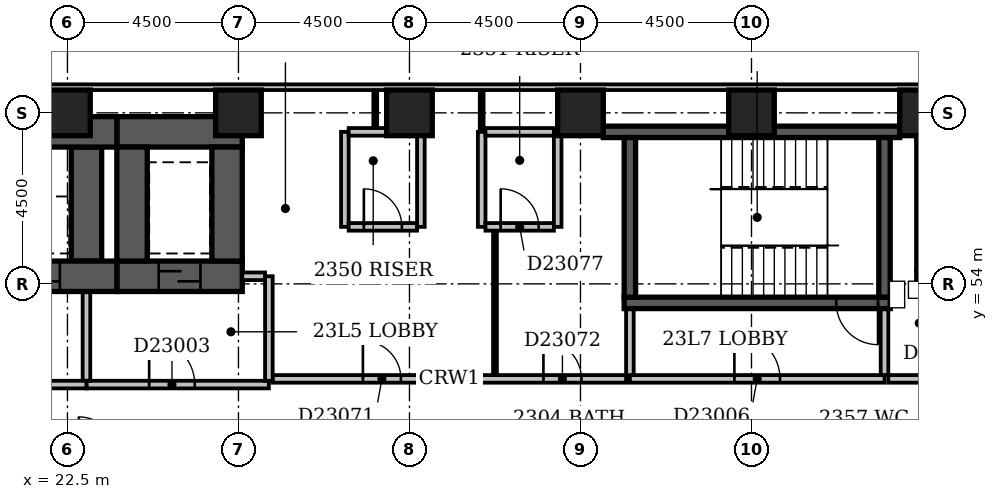
"""IFC4 building model, lengths in metres.
Left out: names, types, materials, properties, quantities, classifications, styles, units other than length and angle.
Written with IfcOpenShell. Run it as: python <this file> out.ifc"""

import sys

from ifc_helpers import new_model, si_unit, direction, frame, frame_2d, origin, origin_2d, place, context, subcontext, project, spatial, rectangle, extrude, element, fill, save


model = new_model("IFC4")
c1 = context("Model", 3, precision=1e-05, world=origin(), true_north=direction((0.0, 1.0)))
c2 = subcontext(c1, "Body", "Model", "MODEL_VIEW")
j1 = project(units=[si_unit("LENGTHUNIT", "METRE"), si_unit("PLANEANGLEUNIT", "RADIAN")], contexts=[c1])
p1 = place(None, origin())
s1 = spatial("IfcSite", under=j1, at=p1, CompositionType="ELEMENT")
p2 = place(p1, origin())
s2 = spatial("IfcBuilding", under=s1, at=p2, CompositionType="ELEMENT")
p3 = place(p2, frame((0.0, 0.0, 93.8)))
s3 = spatial("IfcBuildingStorey", under=s2, at=p3, CompositionType="ELEMENT", Elevation=93.8)
p4 = place(p3, frame((7.35, 54.2, -0.3), z_axis=(0.0, 0.0, 1.0), x_axis=(1.0, 0.0, 0.0)))
e1 = element("IfcWall", 1, at=p4, inside=s3, PredefinedType="SHEAR", context=c2, shape_type="SweptSolid", body=[
    extrude(rectangle(XDim=16.45, YDim=0.8, at=frame_2d((8.225, 0.0))), origin(), (0.0, 0.0, 1.0), 3.6),
])
p5 = place(p4, frame((1.35, 0.0, 0.3)))
e2 = element("IfcOpeningElement", 2, at=p5, cuts=e1, PredefinedType="OPENING", context=c2, shape_type="SweptSolid", body=[
    extrude(rectangle(XDim=1.1, YDim=2.1, at=frame_2d((0.55, 1.05))), frame((0.0, 0.412, 0.0), z_axis=(0.0, -1.0, 0.0), x_axis=(1.0, 0.0, 0.0)), (0.0, 0.0, 1.0), 0.824),
])
p6 = place(p4, frame((3.85, 0.0, 0.3)))
e3 = element("IfcOpeningElement", 3, at=p6, cuts=e1, PredefinedType="OPENING", context=c2, shape_type="SweptSolid", body=[
    extrude(rectangle(XDim=1.1, YDim=2.1, at=frame_2d((0.55, 1.05))), frame((0.0, 0.412, 0.0), z_axis=(0.0, -1.0, 0.0), x_axis=(1.0, 0.0, 0.0)), (0.0, 0.0, 1.0), 0.824),
])
p7 = place(p4, frame((6.35, 0.0, 0.3)))
e4 = element("IfcOpeningElement", 4, at=p7, cuts=e1, PredefinedType="OPENING", context=c2, shape_type="SweptSolid", body=[
    extrude(rectangle(XDim=1.1, YDim=2.1, at=frame_2d((0.55, 1.05))), frame((0.0, 0.412, 0.0), z_axis=(0.0, -1.0, 0.0), x_axis=(1.0, 0.0, 0.0)), (0.0, 0.0, 1.0), 0.824),
])
p8 = place(p4, frame((8.85, 0.0, 0.3)))
e5 = element("IfcOpeningElement", 5, at=p8, cuts=e1, PredefinedType="OPENING", context=c2, shape_type="SweptSolid", body=[
    extrude(rectangle(XDim=1.1, YDim=2.1, at=frame_2d((0.55, 1.05))), frame((0.0, 0.412, 0.0), z_axis=(0.0, -1.0, 0.0), x_axis=(1.0, 0.0, 0.0)), (0.0, 0.0, 1.0), 0.824),
])
p9 = place(p4, frame((11.35, 0.0, 0.3)))
e6 = element("IfcOpeningElement", 6, at=p9, cuts=e1, PredefinedType="OPENING", context=c2, shape_type="SweptSolid", body=[
    extrude(rectangle(XDim=1.1, YDim=2.1, at=frame_2d((0.55, 1.05))), frame((0.0, 0.412, 0.0), z_axis=(0.0, -1.0, 0.0), x_axis=(1.0, 0.0, 0.0)), (0.0, 0.0, 1.0), 0.824),
])
p10 = place(p4, frame((13.85, 0.0, 0.3)))
e7 = element("IfcOpeningElement", 7, at=p10, cuts=e1, PredefinedType="OPENING", context=c2, shape_type="SweptSolid", body=[
    extrude(rectangle(XDim=1.1, YDim=2.1, at=frame_2d((0.55, 1.05))), frame((0.0, 0.412, 0.0), z_axis=(0.0, -1.0, 0.0), x_axis=(1.0, 0.0, 0.0)), (0.0, 0.0, 1.0), 0.824),
])
p11 = place(p3, frame((7.35, 58.0, -0.3), z_axis=(0.0, 0.0, 1.0), x_axis=(1.0, 0.0, 0.0)))
e8 = element("IfcWall", 8, at=p11, inside=s3, PredefinedType="SHEAR", context=c2, shape_type="SweptSolid", body=[
    extrude(rectangle(XDim=16.45, YDim=0.8, at=frame_2d((8.225, 0.0))), origin(), (0.0, 0.0, 1.0), 3.6),
])
p12 = place(p3, frame((23.0, 54.6, -0.3), z_axis=(0.0, 0.0, 1.0), x_axis=(0.0, 1.0, 0.0)))
e9 = element("IfcWall", 9, at=p12, inside=s3, PredefinedType="SHEAR", context=c2, shape_type="SweptSolid", body=[
    extrude(rectangle(XDim=3.0, YDim=0.8, at=frame_2d((1.5, 0.0))), origin(), (0.0, 0.0, 1.0), 3.6),
])
p13 = place(p3, frame((23.8, 54.2, -0.3), z_axis=(0.0, 0.0, 1.0), x_axis=(1.0, 0.0, 0.0)))
e10 = element("IfcWall", 10, at=p13, inside=s3, PredefinedType="SHEAR", context=c2, shape_type="SweptSolid", body=[
    extrude(rectangle(XDim=3.3, YDim=0.8, at=frame_2d((1.65, 0.0))), origin(), (0.0, 0.0, 1.0), 3.6),
])
p14 = place(p13, frame((1.1, 0.0, 0.3)))
e11 = element("IfcOpeningElement", 11, at=p14, cuts=e10, PredefinedType="OPENING", context=c2, shape_type="SweptSolid", body=[
    extrude(rectangle(XDim=1.1, YDim=2.1, at=frame_2d((0.55, 1.05))), frame((0.0, 0.412, 0.0), z_axis=(0.0, -1.0, 0.0), x_axis=(1.0, 0.0, 0.0)), (0.0, 0.0, 1.0), 0.824),
])
p15 = place(p3, frame((23.8, 58.0, -0.3), z_axis=(0.0, 0.0, 1.0), x_axis=(1.0, 0.0, 0.0)))
e12 = element("IfcWall", 12, at=p15, inside=s3, PredefinedType="SHEAR", context=c2, shape_type="SweptSolid", body=[
    extrude(rectangle(XDim=3.3, YDim=0.8, at=frame_2d((1.65, 0.0))), origin(), (0.0, 0.0, 1.0), 3.6),
])
for number, where, z_axis, x_axis in (
    (13, (24.2, 54.6, -0.3), (0.0, 0.0, 1.0), (0.0, 1.0, 0.0)),
    (14, (26.7, 54.6, -0.3), (0.0, 0.0, 1.0), (0.0, 1.0, 0.0)),
):
    element("IfcWall", number, at=place(p3, frame(where, z_axis=z_axis, x_axis=x_axis)), inside=s3, PredefinedType="SHEAR", context=c2, shape_type="SweptSolid", body=[
        extrude(rectangle(XDim=3.0, YDim=0.8, at=frame_2d((1.5, 0.0))), origin(), (0.0, 0.0, 1.0), 3.6),
    ])
p16 = place(p3, frame((36.6, 58.0, -0.3), z_axis=(0.0, 0.0, 1.0), x_axis=(1.0, 0.0, 0.0)))
e15 = element("IfcWall", 15, at=p16, inside=s3, PredefinedType="SHEAR", context=c2, shape_type="SweptSolid", body=[
    extrude(rectangle(XDim=7.8, YDim=0.3, at=frame_2d((3.9, 0.0))), origin(), (0.0, 0.0, 1.0), 3.6),
])
p17 = place(p3, frame((37.15, 53.5, -0.3), z_axis=(0.0, 0.0, 1.0), x_axis=(1.0, 0.0, 0.0)))
e16 = element("IfcWall", 16, at=p17, inside=s3, PredefinedType="SHEAR", context=c2, shape_type="SweptSolid", body=[
    extrude(rectangle(XDim=7.0, YDim=0.3, at=frame_2d((3.5, 0.0))), origin(), (0.0, 0.0, 1.0), 3.6),
])
p18 = place(p17, frame((5.58, 0.0, 0.3)))
e17 = element("IfcOpeningElement", 17, at=p18, cuts=e16, PredefinedType="OPENING", context=c2, shape_type="SweptSolid", body=[
    extrude(rectangle(XDim=1.1, YDim=2.1, at=frame_2d((0.55, 1.05))), frame((0.0, 0.162, 0.0), z_axis=(0.0, -1.0, 0.0), x_axis=(1.0, 0.0, 0.0)), (0.0, 0.0, 1.0), 0.324),
])
for number, where, z_axis, x_axis in (
    (18, (37.3, 53.65, -0.3), (0.0, 0.0, 1.0), (0.0, 1.0, 0.0)),
    (19, (44.0, 53.65, -0.3), (0.0, 0.0, 1.0), (0.0, 1.0, 0.0)),
):
    element("IfcWall", number, at=place(p3, frame(where, z_axis=z_axis, x_axis=x_axis)), inside=s3, PredefinedType="SHEAR", context=c2, shape_type="SweptSolid", body=[
        extrude(rectangle(XDim=4.2, YDim=0.3, at=frame_2d((2.1, 0.0))), origin(), (0.0, 0.0, 1.0), 3.6),
    ])
p19 = place(p3, frame((44.85, 54.2, -0.3), z_axis=(0.0, 0.0, 1.0), x_axis=(1.0, 0.0, 0.0)))
e20 = element("IfcWall", 20, at=p19, inside=s3, PredefinedType="SHEAR", context=c2, shape_type="SweptSolid", body=[
    extrude(rectangle(XDim=2.15, YDim=0.3, at=frame_2d((1.075, 0.0))), origin(), (0.0, 0.0, 1.0), 3.6),
])
p20 = place(p19, frame((0.65, 0.0, 0.3)))
e21 = element("IfcOpeningElement", 21, at=p20, cuts=e20, PredefinedType="OPENING", context=c2, shape_type="SweptSolid", body=[
    extrude(rectangle(XDim=1.0, YDim=2.1, at=frame_2d((0.5, 1.05))), frame((0.0, 0.162, 0.0), z_axis=(0.0, -1.0, 0.0), x_axis=(1.0, 0.0, 0.0)), (0.0, 0.0, 1.0), 0.324),
])
p21 = place(p3, frame((44.85, 58.0, -0.3), z_axis=(0.0, 0.0, 1.0), x_axis=(1.0, 0.0, 0.0)))
e22 = element("IfcWall", 22, at=p21, inside=s3, PredefinedType="SHEAR", context=c2, shape_type="SweptSolid", body=[
    extrude(rectangle(XDim=2.15, YDim=0.3, at=frame_2d((1.075, 0.0))), origin(), (0.0, 0.0, 1.0), 3.6),
])
p22 = place(p3, frame((45.0, 54.35, -0.3), z_axis=(0.0, 0.0, 1.0), x_axis=(0.0, 1.0, 0.0)))
e23 = element("IfcWall", 23, at=p22, inside=s3, PredefinedType="SHEAR", context=c2, shape_type="SweptSolid", body=[
    extrude(rectangle(XDim=3.5, YDim=0.3, at=frame_2d((1.75, 0.0))), origin(), (0.0, 0.0, 1.0), 3.6),
])
for number, where, z_axis, x_axis in (
    (24, (22.5, 58.5, -0.3), (0.0, 0.0, 1.0), (1.0, 0.0, 0.0)),
    (25, (27.0, 58.5, -0.3), (0.0, 0.0, 1.0), (1.0, 0.0, 0.0)),
    (26, (31.5, 58.5, -0.3), (0.0, 0.0, 1.0), (1.0, 0.0, 0.0)),
    (27, (36.0, 58.5, -0.3), (0.0, 0.0, 1.0), (1.0, 0.0, 0.0)),
    (28, (40.5, 58.5, -0.3), (0.0, 0.0, 1.0), (1.0, 0.0, 0.0)),
    (29, (45.0, 58.5, -0.3), (0.0, 0.0, 1.0), (1.0, 0.0, 0.0)),
):
    element("IfcColumn", number, at=place(p3, frame(where, z_axis=z_axis, x_axis=x_axis)), inside=s3, PredefinedType="COLUMN", context=c2, shape_type="SweptSolid", body=[
        extrude(rectangle(XDim=1.2, YDim=1.2, at=origin_2d()), origin(), (0.0, 0.0, 1.0), 3.6),
    ])
p23 = place(p3, frame((68.1, 59.175, 0.0), z_axis=(0.0, 0.0, 1.0), x_axis=(-1.0, 0.0, 0.0)))
e30 = element("IfcWall", 30, at=p23, inside=s3, PredefinedType="STANDARD", context=c2, shape_type="SweptSolid", body=[
    extrude(rectangle(XDim=68.85, YDim=0.15, at=frame_2d((34.425, 0.0))), origin(), (0.0, 0.0, 1.0), 2.7),
])
p24 = place(p23, frame((2.49, 0.0, 0.6)))
e31 = element("IfcOpeningElement", 31, at=p24, cuts=e30, PredefinedType="OPENING", context=c2, shape_type="SweptSolid", body=[
    extrude(rectangle(XDim=1.8, YDim=1.8, at=frame_2d((0.9, 0.9))), frame((0.0, 0.087, 0.0), z_axis=(0.0, -1.0, 0.0), x_axis=(1.0, 0.0, 0.0)), (0.0, 0.0, 1.0), 0.174),
])
p25 = place(p23, frame((6.15, 0.0, 0.6)))
e32 = element("IfcOpeningElement", 32, at=p25, cuts=e30, PredefinedType="OPENING", context=c2, shape_type="SweptSolid", body=[
    extrude(rectangle(XDim=2.4, YDim=1.8, at=frame_2d((1.2, 0.9))), frame((0.0, 0.087, 0.0), z_axis=(0.0, -1.0, 0.0), x_axis=(1.0, 0.0, 0.0)), (0.0, 0.0, 1.0), 0.174),
])
p26 = place(p3, frame((8.0, 51.35, 0.0), z_axis=(0.0, 0.0, 1.0), x_axis=(1.0, 0.0, 0.0)))
e33 = element("IfcWall", 33, at=p26, inside=s3, PredefinedType="PARTITIONING", context=c2, shape_type="SweptSolid", body=[
    extrude(rectangle(XDim=15.0, YDim=0.2, at=frame_2d((7.5, 0.0))), origin(), (0.0, 0.0, 1.0), 3.3),
])
p27 = place(p26, frame((3.4, 0.0, 0.0)))
e34 = element("IfcOpeningElement", 34, at=p27, cuts=e33, PredefinedType="OPENING", context=c2, shape_type="SweptSolid", body=[
    extrude(rectangle(XDim=1.2, YDim=2.1, at=frame_2d((0.6, 1.05))), frame((0.0, 0.112, 0.0), z_axis=(0.0, -1.0, 0.0), x_axis=(1.0, 0.0, 0.0)), (0.0, 0.0, 1.0), 0.224),
])
p28 = place(p26, frame((9.4, 0.0, 0.0)))
e35 = element("IfcOpeningElement", 35, at=p28, cuts=e33, PredefinedType="OPENING", context=c2, shape_type="SweptSolid", body=[
    extrude(rectangle(XDim=1.2, YDim=2.1, at=frame_2d((0.6, 1.05))), frame((0.0, 0.112, 0.0), z_axis=(0.0, -1.0, 0.0), x_axis=(1.0, 0.0, 0.0)), (0.0, 0.0, 1.0), 0.224),
])
p29 = place(p3, frame((23.0, 51.45, 0.0), z_axis=(0.0, 0.0, 1.0), x_axis=(0.0, 1.0, 0.0)))
e36 = element("IfcWall", 36, at=p29, inside=s3, PredefinedType="PARTITIONING", context=c2, shape_type="SweptSolid", body=[
    extrude(rectangle(XDim=2.33, YDim=0.2, at=frame_2d((1.165, 0.0))), origin(), (0.0, 0.0, 1.0), 3.3),
])
p30 = place(p3, frame((23.0, 51.35, 0.0), z_axis=(0.0, 0.0, 1.0), x_axis=(1.0, 0.0, 0.0)))
e37 = element("IfcWall", 37, at=p30, inside=s3, PredefinedType="PARTITIONING", context=c2, shape_type="SweptSolid", body=[
    extrude(rectangle(XDim=4.8, YDim=0.2, at=frame_2d((2.4, 0.0))), origin(), (0.0, 0.0, 1.0), 3.3),
])
p31 = place(p30, frame((1.65, 0.0, 0.0)))
e38 = element("IfcOpeningElement", 38, at=p31, cuts=e37, PredefinedType="OPENING", context=c2, shape_type="SweptSolid", body=[
    extrude(rectangle(XDim=1.2, YDim=2.1, at=frame_2d((0.6, 1.05))), frame((0.0, 0.112, 0.0), z_axis=(0.0, -1.0, 0.0), x_axis=(1.0, 0.0, 0.0)), (0.0, 0.0, 1.0), 0.224),
])
p32 = place(p3, frame((27.8, 51.45, 0.0), z_axis=(0.0, 0.0, 1.0), x_axis=(0.0, 1.0, 0.0)))
e39 = element("IfcWall", 39, at=p32, inside=s3, PredefinedType="PARTITIONING", context=c2, shape_type="SweptSolid", body=[
    extrude(rectangle(XDim=2.75, YDim=0.2, at=frame_2d((1.375, 0.0))), origin(), (0.0, 0.0, 1.0), 3.3),
])
p33 = place(p3, frame((27.1, 54.2, 0.0), z_axis=(0.0, 0.0, 1.0), x_axis=(1.0, 0.0, 0.0)))
e40 = element("IfcWall", 40, at=p33, inside=s3, PredefinedType="PARTITIONING", context=c2, shape_type="SweptSolid", body=[
    extrude(rectangle(XDim=0.6, YDim=0.2, at=frame_2d((0.3, 0.0))), origin(), (0.0, 0.0, 1.0), 3.3),
])
p34 = place(p3, frame((37.3, 51.5, 0.0), z_axis=(0.0, 0.0, 1.0), x_axis=(1.0, 0.0, 0.0)))
e41 = element("IfcWall", 41, at=p34, inside=s3, PredefinedType="PARTITIONING", context=c2, shape_type="SweptSolid", body=[
    extrude(rectangle(XDim=6.7, YDim=0.2, at=frame_2d((3.35, 0.0))), origin(), (0.0, 0.0, 1.0), 3.3),
])
p35 = place(p34, frame((2.75, 0.0, 0.0)))
e42 = element("IfcOpeningElement", 42, at=p35, cuts=e41, PredefinedType="OPENING", context=c2, shape_type="SweptSolid", body=[
    extrude(rectangle(XDim=1.2, YDim=2.1, at=frame_2d((0.6, 1.05))), frame((0.0, 0.112, 0.0), z_axis=(0.0, -1.0, 0.0), x_axis=(1.0, 0.0, 0.0)), (0.0, 0.0, 1.0), 0.224),
])
for number, where, z_axis, x_axis in (
    (43, (44.0, 51.6, 0.0), (0.0, 0.0, 1.0), (0.0, 1.0, 0.0)),
    (44, (37.3, 51.6, 0.0), (0.0, 0.0, 1.0), (0.0, 1.0, 0.0)),
):
    element("IfcWall", number, at=place(p3, frame(where, z_axis=z_axis, x_axis=x_axis)), inside=s3, PredefinedType="PARTITIONING", context=c2, shape_type="SweptSolid", body=[
        extrude(rectangle(XDim=1.73, YDim=0.2, at=frame_2d((0.865, 0.0))), origin(), (0.0, 0.0, 1.0), 3.3),
    ])
p36 = place(p3, frame((27.9, 51.5, 0.0), z_axis=(0.0, 0.0, 1.0), x_axis=(1.0, 0.0, 0.0)))
e45 = element("IfcWall", 45, at=p36, inside=s3, PredefinedType="PARTITIONING", context=c2, shape_type="SweptSolid", body=[
    extrude(rectangle(XDim=9.3, YDim=0.2, at=frame_2d((4.65, 0.0))), origin(), (0.0, 0.0, 1.0), 3.3),
])
p37 = place(p36, frame((2.375, 0.0, 0.0)))
e46 = element("IfcOpeningElement", 46, at=p37, cuts=e45, PredefinedType="OPENING", context=c2, shape_type="SweptSolid", body=[
    extrude(rectangle(XDim=1.0, YDim=2.1, at=frame_2d((0.5, 1.05))), frame((0.0, 0.112, 0.0), z_axis=(0.0, -1.0, 0.0), x_axis=(1.0, 0.0, 0.0)), (0.0, 0.0, 1.0), 0.224),
])
p38 = place(p36, frame((7.125, 0.0, 0.0)))
e47 = element("IfcOpeningElement", 47, at=p38, cuts=e45, PredefinedType="OPENING", context=c2, shape_type="SweptSolid", body=[
    extrude(rectangle(XDim=1.0, YDim=2.1, at=frame_2d((0.5, 1.05))), frame((0.0, 0.112, 0.0), z_axis=(0.0, -1.0, 0.0), x_axis=(1.0, 0.0, 0.0)), (0.0, 0.0, 1.0), 0.224),
])
p39 = place(p3, frame((44.1, 51.5, 0.0), z_axis=(0.0, 0.0, 1.0), x_axis=(1.0, 0.0, 0.0)))
e48 = element("IfcWall", 48, at=p39, inside=s3, PredefinedType="PARTITIONING", context=c2, shape_type="SweptSolid", body=[
    extrude(rectangle(XDim=2.8, YDim=0.2, at=frame_2d((1.4, 0.0))), origin(), (0.0, 0.0, 1.0), 3.3),
])
p40 = place(p39, frame((1.0, 0.0, 0.0)))
e49 = element("IfcOpeningElement", 49, at=p40, cuts=e48, PredefinedType="OPENING", context=c2, shape_type="SweptSolid", body=[
    extrude(rectangle(XDim=0.8, YDim=2.1, at=frame_2d((0.4, 1.05))), frame((0.0, 0.112, 0.0), z_axis=(0.0, -1.0, 0.0), x_axis=(1.0, 0.0, 0.0)), (0.0, 0.0, 1.0), 0.224),
])
p41 = place(p3, frame((33.75, 51.6, 0.0), z_axis=(0.0, 0.0, 1.0), x_axis=(0.0, 1.0, 0.0)))
e50 = element("IfcWall", 50, at=p41, inside=s3, PredefinedType="PARTITIONING", context=c2, shape_type="SweptSolid", body=[
    extrude(rectangle(XDim=3.8, YDim=0.1, at=frame_2d((1.9, 0.0))), origin(), (0.0, 0.0, 1.0), 3.3),
])
p42 = place(p3, frame((29.8, 55.5, 0.0), z_axis=(0.0, 0.0, 1.0), x_axis=(0.0, 1.0, 0.0)))
e51 = element("IfcWall", 51, at=p42, inside=s3, PredefinedType="PARTITIONING", context=c2, shape_type="SweptSolid", body=[
    extrude(rectangle(XDim=2.5, YDim=0.2, at=frame_2d((1.25, 0.0))), origin(), (0.0, 0.0, 1.0), 3.3),
])
p43 = place(p3, frame((29.9, 55.5, 0.0), z_axis=(0.0, 0.0, 1.0), x_axis=(1.0, 0.0, 0.0)))
e52 = element("IfcWall", 52, at=p43, inside=s3, PredefinedType="PARTITIONING", context=c2, shape_type="SweptSolid", body=[
    extrude(rectangle(XDim=1.8, YDim=0.2, at=frame_2d((0.9, 0.0))), origin(), (0.0, 0.0, 1.0), 3.3),
])
p44 = place(p43, frame((0.4, 0.0, 0.0)))
e53 = element("IfcOpeningElement", 53, at=p44, cuts=e52, PredefinedType="OPENING", context=c2, shape_type="SweptSolid", body=[
    extrude(rectangle(XDim=1.0, YDim=2.1, at=frame_2d((0.5, 1.05))), frame((0.0, 0.112, 0.0), z_axis=(0.0, -1.0, 0.0), x_axis=(1.0, 0.0, 0.0)), (0.0, 0.0, 1.0), 0.224),
])
for number, where, z_axis, x_axis in (
    (54, (31.8, 55.5, 0.0), (0.0, 0.0, 1.0), (0.0, 1.0, 0.0)),
    (55, (33.4, 55.5, 0.0), (0.0, 0.0, 1.0), (0.0, 1.0, 0.0)),
):
    element("IfcWall", number, at=place(p3, frame(where, z_axis=z_axis, x_axis=x_axis)), inside=s3, PredefinedType="PARTITIONING", context=c2, shape_type="SweptSolid", body=[
        extrude(rectangle(XDim=2.5, YDim=0.2, at=frame_2d((1.25, 0.0))), origin(), (0.0, 0.0, 1.0), 3.3),
    ])
p45 = place(p3, frame((33.5, 55.5, 0.0), z_axis=(0.0, 0.0, 1.0), x_axis=(1.0, 0.0, 0.0)))
e56 = element("IfcWall", 56, at=p45, inside=s3, PredefinedType="PARTITIONING", context=c2, shape_type="SweptSolid", body=[
    extrude(rectangle(XDim=1.8, YDim=0.2, at=frame_2d((0.9, 0.0))), origin(), (0.0, 0.0, 1.0), 3.3),
])
p46 = place(p45, frame((0.4, 0.0, 0.0)))
e57 = element("IfcOpeningElement", 57, at=p46, cuts=e56, PredefinedType="OPENING", context=c2, shape_type="SweptSolid", body=[
    extrude(rectangle(XDim=1.0, YDim=2.1, at=frame_2d((0.5, 1.05))), frame((0.0, 0.112, 0.0), z_axis=(0.0, -1.0, 0.0), x_axis=(1.0, 0.0, 0.0)), (0.0, 0.0, 1.0), 0.224),
])
p47 = place(p3, frame((35.4, 55.5, 0.0), z_axis=(0.0, 0.0, 1.0), x_axis=(0.0, 1.0, 0.0)))
e58 = element("IfcWall", 58, at=p47, inside=s3, PredefinedType="PARTITIONING", context=c2, shape_type="SweptSolid", body=[
    extrude(rectangle(XDim=2.5, YDim=0.2, at=frame_2d((1.25, 0.0))), origin(), (0.0, 0.0, 1.0), 2.4),
])
p48 = place(p3, frame((29.9, 58.0, 0.0), z_axis=(0.0, 0.0, 1.0), x_axis=(1.0, 0.0, 0.0)))
e59 = element("IfcWall", 59, at=p48, inside=s3, PredefinedType="PARTITIONING", context=c2, shape_type="SweptSolid", body=[
    extrude(rectangle(XDim=1.8, YDim=0.2, at=frame_2d((0.9, 0.0))), origin(), (0.0, 0.0, 1.0), 3.3),
])
p49 = place(p3, frame((33.4, 58.0, 0.0), z_axis=(0.0, 0.0, 1.0), x_axis=(0.0, 1.0, 0.0)))
e60 = element("IfcWall", 60, at=p49, inside=s3, PredefinedType="PARTITIONING", context=c2, shape_type="SweptSolid", body=[
    extrude(rectangle(XDim=1.1, YDim=0.1, at=frame_2d((0.55, 0.0))), origin(), (0.0, 0.0, 1.0), 3.3),
])
p50 = place(p3, frame((33.5, 58.0, 0.0), z_axis=(0.0, 0.0, 1.0), x_axis=(1.0, 0.0, 0.0)))
e61 = element("IfcWall", 61, at=p50, inside=s3, PredefinedType="PARTITIONING", context=c2, shape_type="SweptSolid", body=[
    extrude(rectangle(XDim=1.8, YDim=0.2, at=frame_2d((0.9, 0.0))), origin(), (0.0, 0.0, 1.0), 3.3),
])
p51 = place(p3, frame((30.6, 58.1, 0.0), z_axis=(0.0, 0.0, 1.0), x_axis=(0.0, 1.0, 0.0)))
e62 = element("IfcWall", 62, at=p51, inside=s3, PredefinedType="PARTITIONING", context=c2, shape_type="SweptSolid", body=[
    extrude(rectangle(XDim=1.0, YDim=0.1, at=frame_2d((0.5, 0.0))), origin(), (0.0, 0.0, 1.0), 3.3),
])
p52 = place(p31, origin())
e63 = element("IfcDoor", 63, at=p52, inside=s3, OperationType="SINGLE_SWING_LEFT", PredefinedType="DOOR", context=c2, shape_type="SweptSolid", body=[
    extrude(rectangle(XDim=1.2, YDim=2.1, at=frame_2d((0.6, 1.05))), frame((0.0, 0.025, 0.0), z_axis=(0.0, -1.0, 0.0), x_axis=(1.0, 0.0, 0.0)), (0.0, 0.0, 1.0), 0.05),
])
fill(e38, e63)
p53 = place(p14, origin())
e64 = element("IfcDoor", 64, at=p53, inside=s3, OperationType="SLIDING_TO_LEFT", PredefinedType="DOOR", context=c2, shape_type="SweptSolid", body=[
    extrude(rectangle(XDim=1.1, YDim=2.1, at=frame_2d((0.55, 1.05))), frame((0.0, 0.025, 0.0), z_axis=(0.0, -1.0, 0.0), x_axis=(1.0, 0.0, 0.0)), (0.0, 0.0, 1.0), 0.05),
])
fill(e11, e64)
p54 = place(p10, origin())
e65 = element("IfcDoor", 65, at=p54, inside=s3, OperationType="SLIDING_TO_LEFT", PredefinedType="DOOR", context=c2, shape_type="SweptSolid", body=[
    extrude(rectangle(XDim=1.1, YDim=2.1, at=frame_2d((0.55, 1.05))), frame((0.0, 0.025, 0.0), z_axis=(0.0, -1.0, 0.0), x_axis=(1.0, 0.0, 0.0)), (0.0, 0.0, 1.0), 0.05),
])
fill(e7, e65)
p55 = place(p35, origin())
e66 = element("IfcDoor", 66, at=p55, inside=s3, OperationType="SINGLE_SWING_LEFT", PredefinedType="DOOR", context=c2, shape_type="SweptSolid", body=[
    extrude(rectangle(XDim=1.2, YDim=2.1, at=frame_2d((0.6, 1.05))), frame((0.0, 0.025, 0.0), z_axis=(0.0, -1.0, 0.0), x_axis=(1.0, 0.0, 0.0)), (0.0, 0.0, 1.0), 0.05),
])
fill(e42, e66)
p56 = place(p18, origin())
e67 = element("IfcDoor", 67, at=p56, inside=s3, OperationType="SINGLE_SWING_RIGHT", PredefinedType="DOOR", context=c2, shape_type="SweptSolid", body=[
    extrude(rectangle(XDim=1.1, YDim=2.1, at=frame_2d((0.55, 1.05))), frame((0.0, 0.025, 0.0), z_axis=(0.0, -1.0, 0.0), x_axis=(1.0, 0.0, 0.0)), (0.0, 0.0, 1.0), 0.05),
])
fill(e17, e67)
p57 = place(p37, origin())
e68 = element("IfcDoor", 68, at=p57, inside=s3, OperationType="SINGLE_SWING_LEFT", PredefinedType="DOOR", context=c2, shape_type="SweptSolid", body=[
    extrude(rectangle(XDim=1.0, YDim=2.1, at=frame_2d((0.5, 1.05))), frame((0.0, 0.025, 0.0), z_axis=(0.0, -1.0, 0.0), x_axis=(1.0, 0.0, 0.0)), (0.0, 0.0, 1.0), 0.05),
])
fill(e46, e68)
p58 = place(p38, origin())
e69 = element("IfcDoor", 69, at=p58, inside=s3, OperationType="SINGLE_SWING_LEFT", PredefinedType="DOOR", context=c2, shape_type="SweptSolid", body=[
    extrude(rectangle(XDim=1.0, YDim=2.1, at=frame_2d((0.5, 1.05))), frame((0.0, 0.025, 0.0), z_axis=(0.0, -1.0, 0.0), x_axis=(1.0, 0.0, 0.0)), (0.0, 0.0, 1.0), 0.05),
])
fill(e47, e69)
p59 = place(p44, origin())
e70 = element("IfcDoor", 70, at=p59, inside=s3, OperationType="SINGLE_SWING_LEFT", PredefinedType="DOOR", context=c2, shape_type="SweptSolid", body=[
    extrude(rectangle(XDim=1.0, YDim=2.1, at=frame_2d((0.5, 1.05))), frame((0.0, 0.025, 0.0), z_axis=(0.0, -1.0, 0.0), x_axis=(1.0, 0.0, 0.0)), (0.0, 0.0, 1.0), 0.05),
])
fill(e53, e70)
p60 = place(p46, origin())
e71 = element("IfcDoor", 71, at=p60, inside=s3, OperationType="SINGLE_SWING_LEFT", PredefinedType="DOOR", context=c2, shape_type="SweptSolid", body=[
    extrude(rectangle(XDim=1.0, YDim=2.1, at=frame_2d((0.5, 1.05))), frame((0.0, 0.025, 0.0), z_axis=(0.0, -1.0, 0.0), x_axis=(1.0, 0.0, 0.0)), (0.0, 0.0, 1.0), 0.05),
])
fill(e57, e71)
save(model, sys.argv[1])
